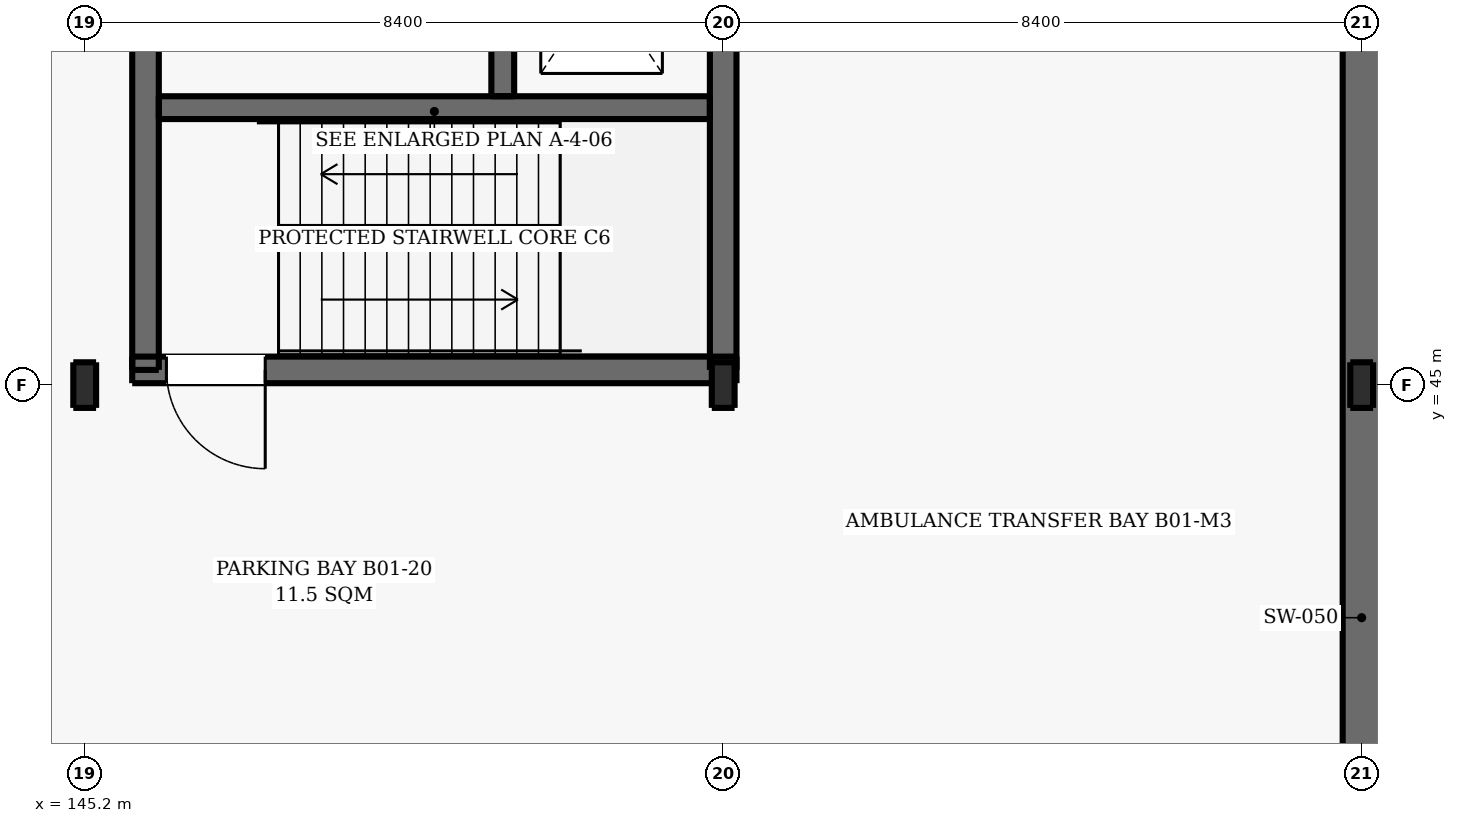
"""IFC4 building model, lengths in metres.
Left out: names, types, materials, properties, quantities, classifications, styles, units other than length and angle.
Written with IfcOpenShell. Run it as: python <this file> out.ifc"""

import sys

from ifc_helpers import new_model, si_unit, direction, frame, frame_2d, origin, origin_2d, place, context, subcontext, project, spatial, rectangle, i_section, extrude, element, fill, save


model = new_model("IFC4")
c1 = context("Model", 3, precision=1e-05, world=origin(), true_north=direction((0.0, 1.0)))
c2 = subcontext(c1, "Body", "Model", "MODEL_VIEW")
j1 = project(units=[si_unit("LENGTHUNIT", "METRE"), si_unit("PLANEANGLEUNIT", "RADIAN")], contexts=[c1])
p1 = place(None, origin())
s1 = spatial("IfcSite", under=j1, at=p1, CompositionType="ELEMENT")
p2 = place(p1, origin())
s2 = spatial("IfcBuilding", under=s1, at=p2, CompositionType="ELEMENT")
p3 = place(p2, frame((0.0, 0.0, -4.8)))
s3 = spatial("IfcBuildingStorey", under=s2, at=p3, CompositionType="ELEMENT", Elevation=-4.8)
for number, where, z_axis, x_axis in (
    (1, (145.2, 45.0, 0.0), (0.0, 0.0, 1.0), (1.0, 0.0, 0.0)),
    (2, (153.6, 45.0, 0.0), (0.0, 0.0, 1.0), (1.0, 0.0, 0.0)),
    (3, (162.0, 45.0, 0.0), (0.0, 0.0, 1.0), (1.0, 0.0, 0.0)),
):
    element("IfcColumn", number, at=place(p3, frame(where, z_axis=z_axis, x_axis=x_axis)), inside=s3, PredefinedType="COLUMN", context=c2, shape_type="SweptSolid", body=[
        extrude(i_section(OverallWidth=0.3, OverallDepth=0.6, WebThickness=0.015, FlangeThickness=0.03, FilletRadius=0.027, at=origin_2d()), origin(), (0.0, 0.0, 1.0), 4.8),
    ])
p4 = place(p3, frame((162.0, 52.2, 0.0), z_axis=(0.0, 0.0, 1.0), x_axis=(0.0, -1.0, 0.0)))
e4 = element("IfcWall", 4, at=p4, inside=s3, PredefinedType="SOLIDWALL", context=c2, shape_type="SweptSolid", body=[
    extrude(rectangle(XDim=34.2, YDim=0.5, at=frame_2d((17.1, 0.0))), origin(), (0.0, 0.0, 1.0), 4.5),
])
p5 = place(p3, frame((145.825, 45.2, 0.0), z_axis=(0.0, 0.0, 1.0), x_axis=(1.0, 0.0, 0.0)))
e5 = element("IfcWall", 5, at=p5, inside=s3, PredefinedType="SHEAR", context=c2, shape_type="SweptSolid", body=[
    extrude(rectangle(XDim=7.95, YDim=0.35, at=frame_2d((3.975, 0.0))), origin(), (0.0, 0.0, 1.0), 4.8),
])
p6 = place(p5, frame((0.45, 0.0, 0.0)))
e6 = element("IfcOpeningElement", 6, at=p6, cuts=e5, PredefinedType="OPENING", context=c2, shape_type="SweptSolid", body=[
    extrude(rectangle(XDim=1.3, YDim=2.15, at=frame_2d((0.65, 1.075))), frame((0.0, 0.185, 0.0), z_axis=(0.0, -1.0, 0.0), x_axis=(1.0, 0.0, 0.0)), (0.0, 0.0, 1.0), 0.37),
])
for number, where, z_axis, x_axis in (
    (7, (146.0, 45.2, 0.0), (0.0, 0.0, 1.0), (0.0, 1.0, 0.0)),
    (8, (153.6, 45.2, 0.0), (0.0, 0.0, 1.0), (0.0, 1.0, 0.0)),
):
    element("IfcWall", number, at=place(p3, frame(where, z_axis=z_axis, x_axis=x_axis)), inside=s3, PredefinedType="SHEAR", context=c2, shape_type="SweptSolid", body=[
        extrude(rectangle(XDim=6.8, YDim=0.35, at=frame_2d((3.4, 0.0))), origin(), (0.0, 0.0, 1.0), 4.8),
    ])
p7 = place(p3, frame((146.175, 48.65, 0.0), z_axis=(0.0, 0.0, 1.0), x_axis=(1.0, 0.0, 0.0)))
e9 = element("IfcWall", 9, at=p7, inside=s3, PredefinedType="SHEAR", context=c2, shape_type="SweptSolid", body=[
    extrude(rectangle(XDim=7.25, YDim=0.3, at=frame_2d((3.625, 0.0))), origin(), (0.0, 0.0, 1.0), 4.8),
])
p8 = place(p3, frame((150.7, 48.8, 0.0), z_axis=(0.0, 0.0, 1.0), x_axis=(0.0, 1.0, 0.0)))
e10 = element("IfcWall", 10, at=p8, inside=s3, PredefinedType="SHEAR", context=c2, shape_type="SweptSolid", body=[
    extrude(rectangle(XDim=3.025, YDim=0.3, at=frame_2d((1.512, 0.0))), origin(), (0.0, 0.0, 1.0), 4.8),
])
p9 = place(p8, frame((0.963, 0.0, 0.0)))
e11 = element("IfcOpeningElement", 11, at=p9, cuts=e10, PredefinedType="OPENING", context=c2, shape_type="SweptSolid", body=[
    extrude(rectangle(XDim=1.1, YDim=2.15, at=frame_2d((0.55, 1.075))), frame((0.0, 0.16, 0.0), z_axis=(0.0, -1.0, 0.0), x_axis=(1.0, 0.0, 0.0)), (0.0, 0.0, 1.0), 0.32),
])
p10 = place(p6, frame((1.3, 0.0, 0.0), z_axis=(0.0, 0.0, 1.0), x_axis=(-1.0, 0.0, 0.0)))
e12 = element("IfcDoor", 12, at=p10, inside=s3, OperationType="SINGLE_SWING_RIGHT", PredefinedType="DOOR", context=c2, shape_type="SweptSolid", body=[
    extrude(rectangle(XDim=1.3, YDim=2.15, at=frame_2d((0.65, 1.075))), frame((0.0, 0.025, 0.0), z_axis=(0.0, -1.0, 0.0), x_axis=(1.0, 0.0, 0.0)), (0.0, 0.0, 1.0), 0.05),
])
fill(e6, e12)
save(model, sys.argv[1])
